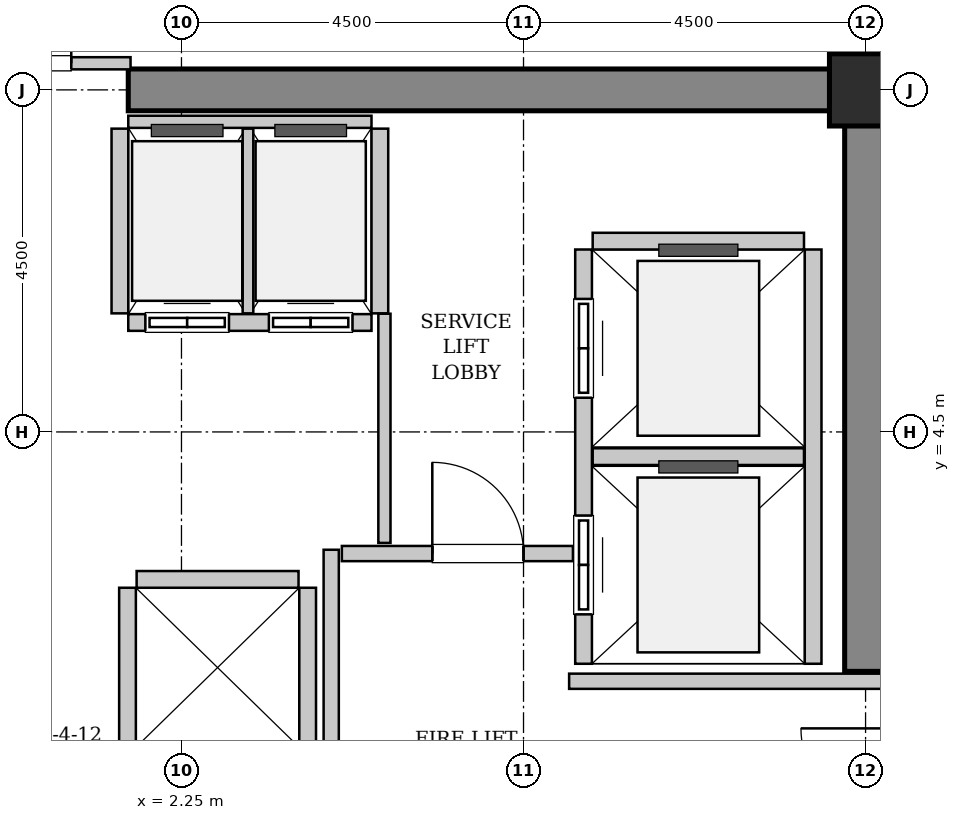
"""IFC4 building model, lengths in metres.
Left out: names, types, materials, properties, quantities, classifications, styles, units other than length and angle.
Written with IfcOpenShell. Run it as: python <this file> out.ifc"""

import sys

from ifc_helpers import new_model, si_unit, direction, frame, frame_2d, origin, origin_2d, place, context, subcontext, project, spatial, rectangle, hollow_rectangle, extrude, source, transform, mapped, element, fill, save


model = new_model("IFC4")
c1 = context("Model", 3, precision=1e-05, world=origin(), true_north=direction((0.0, 1.0)))
c2 = subcontext(c1, "Body", "Model", "MODEL_VIEW")
j1 = project(units=[si_unit("LENGTHUNIT", "METRE"), si_unit("PLANEANGLEUNIT", "RADIAN")], contexts=[c1])
p1 = place(None, origin())
s1 = spatial("IfcSite", under=j1, at=p1, CompositionType="ELEMENT")
p2 = place(p1, origin())
s2 = spatial("IfcBuilding", under=s1, at=p2, CompositionType="ELEMENT")
p3 = place(p2, frame((0.0, 0.0, 109.8)))
s3 = spatial("IfcBuildingStorey", under=s2, at=p3, CompositionType="ELEMENT", Elevation=109.8)
m1 = source(origin(), c2, "Body", "SweptSolid", [
    extrude(rectangle(XDim=9.975, YDim=0.55, at=frame_2d((4.987, 0.0))), origin(), (0.0, 0.0, 1.0), 3.8),
])
p4 = place(p3, frame((1.55, 9.0, 0.0), z_axis=(0.0, 0.0, 1.0), x_axis=(1.0, 0.0, 0.0)))
e1 = element("IfcWall", 1, at=p4, inside=s3, PredefinedType="SHEAR", context=c2, shape_type="MappedRepresentation", body=[
    mapped(m1, transform((0.0, 0.0, 0.0), x_axis=(1.0, 0.0, 0.0), y_axis=(0.0, 1.0, 0.0), z_axis=(0.0, 0.0, 1.0), scale=1.0)),
])
m2 = source(origin(), c2, "Body", "SweptSolid", [
    extrude(rectangle(XDim=7.375, YDim=0.55, at=frame_2d((3.688, 0.0))), origin(), (0.0, 0.0, 1.0), 3.8),
])
p5 = place(p3, frame((11.25, 1.35, 0.0), z_axis=(0.0, 0.0, 1.0), x_axis=(0.0, 1.0, 0.0)))
e2 = element("IfcWall", 2, at=p5, inside=s3, PredefinedType="SHEAR", context=c2, shape_type="MappedRepresentation", body=[
    mapped(m2, transform((0.0, 0.0, 0.0), x_axis=(1.0, 0.0, 0.0), y_axis=(0.0, 1.0, 0.0), z_axis=(0.0, 0.0, 1.0), scale=1.0)),
])
m3 = source(origin(), c2, "Body", "SweptSolid", [
    extrude(hollow_rectangle(XDim=0.95, YDim=0.95, WallThickness=0.045, InnerFilletRadius=0.045, OuterFilletRadius=0.09, at=origin_2d()), origin(), (0.0, 0.0, 1.0), 3.8),
])
p6 = place(p3, frame((11.25, 9.0, 0.0), z_axis=(0.0, 0.0, 1.0), x_axis=(1.0, 0.0, 0.0)))
e3 = element("IfcColumn", 3, at=p6, inside=s3, PredefinedType="COLUMN", context=c2, shape_type="MappedRepresentation", body=[
    mapped(m3, transform((0.0, 0.0, 0.0), x_axis=(1.0, 0.0, 0.0), y_axis=(0.0, 1.0, 0.0), z_axis=(0.0, 0.0, 1.0), scale=1.0)),
])
m4 = source(origin(), c2, "Body", "SweptSolid", [
    extrude(rectangle(XDim=5.45, YDim=0.22, at=frame_2d((2.725, 0.0))), origin(), (0.0, 0.0, 1.0), 3.535),
])
p7 = place(p3, frame((7.54, 6.9, 0.0), z_axis=(0.0, 0.0, 1.0), x_axis=(0.0, -1.0, 0.0)))
e4 = element("IfcWall", 4, at=p7, inside=s3, PredefinedType="SOLIDWALL", context=c2, shape_type="MappedRepresentation", body=[
    mapped(m4, transform((0.0, 0.0, 0.0), x_axis=(1.0, 0.0, 0.0), y_axis=(0.0, 1.0, 0.0), z_axis=(0.0, 0.0, 1.0), scale=1.0)),
])
p8 = place(p7, frame((3.5, 0.0, 0.0)))
e5 = element("IfcOpeningElement", 5, at=p8, cuts=e4, PredefinedType="OPENING", context=c2, shape_type="SweptSolid", body=[
    extrude(rectangle(XDim=1.3, YDim=2.3, at=frame_2d((0.65, 1.15))), frame((0.0, 0.12, 0.0), z_axis=(0.0, -1.0, 0.0), x_axis=(1.0, 0.0, 0.0)), (0.0, 0.0, 1.0), 0.24),
])
p9 = place(p7, frame((0.65, 0.0, 0.0)))
e6 = element("IfcOpeningElement", 6, at=p9, cuts=e4, PredefinedType="OPENING", context=c2, shape_type="SweptSolid", body=[
    extrude(rectangle(XDim=1.3, YDim=2.3, at=frame_2d((0.65, 1.15))), frame((0.0, 0.12, 0.0), z_axis=(0.0, -1.0, 0.0), x_axis=(1.0, 0.0, 0.0)), (0.0, 0.0, 1.0), 0.24),
])
p10 = place(p3, frame((10.56, 1.45, 0.0), z_axis=(0.0, 0.0, 1.0), x_axis=(0.0, 1.0, 0.0)))
e7 = element("IfcWall", 7, at=p10, inside=s3, PredefinedType="SOLIDWALL", context=c2, shape_type="MappedRepresentation", body=[
    mapped(m4, transform((0.0, 0.0, 0.0), x_axis=(1.0, 0.0, 0.0), y_axis=(0.0, 1.0, 0.0), z_axis=(0.0, 0.0, 1.0), scale=1.0)),
])
m5 = source(origin(), c2, "Body", "SweptSolid", [
    extrude(rectangle(XDim=2.78, YDim=0.22, at=frame_2d((1.39, 0.0))), origin(), (0.0, 0.0, 1.0), 3.535),
])
for number, where, z_axis, x_axis in (
    (8, (7.66, 4.175, 0.0), (0.0, 0.0, 1.0), (1.0, 0.0, 0.0)),
    (9, (10.44, 7.01, 0.0), (0.0, 0.0, 1.0), (-1.0, 0.0, 0.0)),
):
    element("IfcWall", number, at=place(p3, frame(where, z_axis=z_axis, x_axis=x_axis)), inside=s3, PredefinedType="SOLIDWALL", context=c2, shape_type="MappedRepresentation", body=[
        mapped(m5, transform((0.0, 0.0, 0.0), x_axis=(1.0, 0.0, 0.0), y_axis=(0.0, 1.0, 0.0), z_axis=(0.0, 0.0, 1.0), scale=1.0)),
    ])
m6 = source(origin(), c2, "Body", "SweptSolid", [
    extrude(rectangle(XDim=3.2, YDim=0.22, at=frame_2d((1.6, 0.0))), origin(), (0.0, 0.0, 1.0), 3.535),
])
p11 = place(p3, frame((1.55, 5.94, 0.0), z_axis=(0.0, 0.0, 1.0), x_axis=(1.0, 0.0, 0.0)))
e10 = element("IfcWall", 10, at=p11, inside=s3, PredefinedType="SOLIDWALL", context=c2, shape_type="MappedRepresentation", body=[
    mapped(m6, transform((0.0, 0.0, 0.0), x_axis=(1.0, 0.0, 0.0), y_axis=(0.0, 1.0, 0.0), z_axis=(0.0, 0.0, 1.0), scale=1.0)),
])
p12 = place(p11, frame((0.225, 0.0, 0.0)))
e11 = element("IfcOpeningElement", 11, at=p12, cuts=e10, PredefinedType="OPENING", context=c2, shape_type="SweptSolid", body=[
    extrude(rectangle(XDim=1.1, YDim=2.2, at=frame_2d((0.55, 1.1))), frame((0.0, 0.12, 0.0), z_axis=(0.0, -1.0, 0.0), x_axis=(1.0, 0.0, 0.0)), (0.0, 0.0, 1.0), 0.24),
])
p13 = place(p11, frame((1.85, 0.0, 0.0)))
e12 = element("IfcOpeningElement", 12, at=p13, cuts=e10, PredefinedType="OPENING", context=c2, shape_type="SweptSolid", body=[
    extrude(rectangle(XDim=1.1, YDim=2.2, at=frame_2d((0.55, 1.1))), frame((0.0, 0.12, 0.0), z_axis=(0.0, -1.0, 0.0), x_axis=(1.0, 0.0, 0.0)), (0.0, 0.0, 1.0), 0.24),
])
m7 = source(origin(), c2, "Body", "SweptSolid", [
    extrude(rectangle(XDim=3.2, YDim=0.16, at=frame_2d((1.6, 0.0))), origin(), (0.0, 0.0, 1.0), 2.425),
])
p14 = place(p3, frame((4.75, 8.58, 0.0), z_axis=(0.0, 0.0, 1.0), x_axis=(-1.0, 0.0, 0.0)))
e13 = element("IfcWall", 13, at=p14, inside=s3, PredefinedType="PARTITIONING", context=c2, shape_type="MappedRepresentation", body=[
    mapped(m7, transform((0.0, 0.0, 0.0), x_axis=(1.0, 0.0, 0.0), y_axis=(0.0, 1.0, 0.0), z_axis=(0.0, 0.0, 1.0), scale=1.0)),
])
m8 = source(origin(), c2, "Body", "SweptSolid", [
    extrude(rectangle(XDim=2.43, YDim=0.22, at=frame_2d((1.215, 0.0))), origin(), (0.0, 0.0, 1.0), 3.535),
])
p15 = place(p3, frame((1.44, 8.49, 0.0), z_axis=(0.0, 0.0, 1.0), x_axis=(0.0, -1.0, 0.0)))
e14 = element("IfcWall", 14, at=p15, inside=s3, PredefinedType="SOLIDWALL", context=c2, shape_type="MappedRepresentation", body=[
    mapped(m8, transform((0.0, 0.0, 0.0), x_axis=(1.0, 0.0, 0.0), y_axis=(0.0, 1.0, 0.0), z_axis=(0.0, 0.0, 1.0), scale=1.0)),
])
m9 = source(origin(), c2, "Body", "SweptSolid", [
    extrude(rectangle(XDim=2.43, YDim=0.14, at=frame_2d((1.215, 0.0))), origin(), (0.0, 0.0, 1.0), 3.535),
])
p16 = place(p3, frame((3.125, 6.06, 0.0), z_axis=(0.0, 0.0, 1.0), x_axis=(0.0, 1.0, 0.0)))
e15 = element("IfcWall", 15, at=p16, inside=s3, PredefinedType="PARTITIONING", context=c2, shape_type="MappedRepresentation", body=[
    mapped(m9, transform((0.0, 0.0, 0.0), x_axis=(1.0, 0.0, 0.0), y_axis=(0.0, 1.0, 0.0), z_axis=(0.0, 0.0, 1.0), scale=1.0)),
])
p17 = place(p3, frame((4.86, 6.06, 0.0), z_axis=(0.0, 0.0, 1.0), x_axis=(0.0, 1.0, 0.0)))
e16 = element("IfcWall", 16, at=p17, inside=s3, PredefinedType="SOLIDWALL", context=c2, shape_type="MappedRepresentation", body=[
    mapped(m8, transform((0.0, 0.0, 0.0), x_axis=(1.0, 0.0, 0.0), y_axis=(0.0, 1.0, 0.0), z_axis=(0.0, 0.0, 1.0), scale=1.0)),
])
m10 = source(origin(), c2, "Body", "SweptSolid", [
    extrude(rectangle(XDim=4.9, YDim=0.22, at=frame_2d((2.45, 0.0))), origin(), (0.0, 0.0, 1.0), 3.535),
])
for number, where, z_axis, x_axis in (
    (17, (1.54, 2.45, 0.0), (0.0, 0.0, 1.0), (0.0, -1.0, 0.0)),
    (18, (3.91, -2.45, 0.0), (0.0, 0.0, 1.0), (0.0, 1.0, 0.0)),
):
    element("IfcWall", number, at=place(p3, frame(where, z_axis=z_axis, x_axis=x_axis)), inside=s3, PredefinedType="SOLIDWALL", context=c2, shape_type="MappedRepresentation", body=[
        mapped(m10, transform((0.0, 0.0, 0.0), x_axis=(1.0, 0.0, 0.0), y_axis=(0.0, 1.0, 0.0), z_axis=(0.0, 0.0, 1.0), scale=1.0)),
    ])
m11 = source(origin(), c2, "Body", "SweptSolid", [
    extrude(rectangle(XDim=2.13, YDim=0.22, at=frame_2d((1.065, 0.0))), origin(), (0.0, 0.0, 1.0), 3.535),
])
p18 = place(p3, frame((3.79, 2.56, 0.0), z_axis=(0.0, 0.0, 1.0), x_axis=(-1.0, 0.0, 0.0)))
e19 = element("IfcWall", 19, at=p18, inside=s3, PredefinedType="SOLIDWALL", context=c2, shape_type="MappedRepresentation", body=[
    mapped(m11, transform((0.0, 0.0, 0.0), x_axis=(1.0, 0.0, 0.0), y_axis=(0.0, 1.0, 0.0), z_axis=(0.0, 0.0, 1.0), scale=1.0)),
])
m12 = source(origin(), c2, "Body", "SweptSolid", [
    extrude(rectangle(XDim=5.9, YDim=0.2, at=frame_2d((2.95, 0.0))), origin(), (0.0, 0.0, 1.0), 3.535),
])
p19 = place(p3, frame((4.22, -2.95, 0.0), z_axis=(0.0, 0.0, 1.0), x_axis=(0.0, 1.0, 0.0)))
e20 = element("IfcWall", 20, at=p19, inside=s3, PredefinedType="PARTITIONING", context=c2, shape_type="MappedRepresentation", body=[
    mapped(m12, transform((0.0, 0.0, 0.0), x_axis=(1.0, 0.0, 0.0), y_axis=(0.0, 1.0, 0.0), z_axis=(0.0, 0.0, 1.0), scale=1.0)),
])
m13 = source(origin(), c2, "Body", "SweptSolid", [
    extrude(rectangle(XDim=3.04, YDim=0.2, at=frame_2d((1.52, 0.0))), origin(), (0.0, 0.0, 1.0), 3.535),
])
p20 = place(p3, frame((4.36, 2.9, 0.0), z_axis=(0.0, 0.0, 1.0), x_axis=(1.0, 0.0, 0.0)))
e21 = element("IfcWall", 21, at=p20, inside=s3, PredefinedType="PARTITIONING", context=c2, shape_type="MappedRepresentation", body=[
    mapped(m13, transform((0.0, 0.0, 0.0), x_axis=(1.0, 0.0, 0.0), y_axis=(0.0, 1.0, 0.0), z_axis=(0.0, 0.0, 1.0), scale=1.0)),
])
p21 = place(p20, frame((1.19, 0.0, 0.0)))
e22 = element("IfcOpeningElement", 22, at=p21, cuts=e21, PredefinedType="OPENING", context=c2, shape_type="SweptSolid", body=[
    extrude(rectangle(XDim=1.2, YDim=2.15, at=frame_2d((0.6, 1.075))), frame((0.0, 0.11, 0.0), z_axis=(0.0, -1.0, 0.0), x_axis=(1.0, 0.0, 0.0)), (0.0, 0.0, 1.0), 0.22),
])
m14 = source(origin(), c2, "Body", "SweptSolid", [
    extrude(rectangle(XDim=4.11, YDim=0.2, at=frame_2d((2.055, 0.0))), origin(), (0.0, 0.0, 1.0), 3.535),
])
p22 = place(p3, frame((7.35, 1.22, 0.0), z_axis=(0.0, 0.0, 1.0), x_axis=(1.0, 0.0, 0.0)))
e23 = element("IfcWall", 23, at=p22, inside=s3, PredefinedType="PARTITIONING", context=c2, shape_type="MappedRepresentation", body=[
    mapped(m14, transform((0.0, 0.0, 0.0), x_axis=(1.0, 0.0, 0.0), y_axis=(0.0, 1.0, 0.0), z_axis=(0.0, 0.0, 1.0), scale=1.0)),
])
m15 = source(origin(), c2, "Body", "SweptSolid", [
    extrude(rectangle(XDim=3.16, YDim=0.16, at=frame_2d((1.58, 0.0))), origin(), (0.0, 0.0, 1.0), 2.425),
])
p23 = place(p3, frame((-1.58, 9.35, 0.0), z_axis=(0.0, 0.0, 1.0), x_axis=(1.0, 0.0, 0.0)))
e24 = element("IfcWall", 24, at=p23, inside=s3, PredefinedType="PARTITIONING", context=c2, shape_type="MappedRepresentation", body=[
    mapped(m15, transform((0.0, 0.0, 0.0), x_axis=(1.0, 0.0, 0.0), y_axis=(0.0, 1.0, 0.0), z_axis=(0.0, 0.0, 1.0), scale=1.0)),
])
p24 = place(p23, frame((0.78, 0.0, 0.0)))
e25 = element("IfcOpeningElement", 25, at=p24, cuts=e24, PredefinedType="OPENING", context=c2, shape_type="SweptSolid", body=[
    extrude(rectangle(XDim=1.6, YDim=2.3, at=frame_2d((0.8, 1.15))), frame((0.0, 0.09, 0.0), z_axis=(0.0, -1.0, 0.0), x_axis=(1.0, 0.0, 0.0)), (0.0, 0.0, 1.0), 0.18),
])
m16 = source(origin(), c2, "Body", "SweptSolid", [
    extrude(rectangle(XDim=3.015, YDim=0.16, at=frame_2d((1.507, 0.0))), origin(), (0.0, 0.0, 1.0), 3.535),
])
p25 = place(p3, frame((4.92, 3.04, 0.0), z_axis=(0.0, 0.0, 1.0), x_axis=(0.0, 1.0, 0.0)))
e26 = element("IfcWall", 26, at=p25, inside=s3, PredefinedType="PARTITIONING", context=c2, shape_type="MappedRepresentation", body=[
    mapped(m16, transform((0.0, 0.0, 0.0), x_axis=(1.0, 0.0, 0.0), y_axis=(0.0, 1.0, 0.0), z_axis=(0.0, 0.0, 1.0), scale=1.0)),
])
m17 = source(origin(), c2, "Body", "SweptSolid", [
    extrude(rectangle(XDim=1.3, YDim=2.3, at=frame_2d((0.65, 1.15))), frame((0.0, 0.025, 0.0), z_axis=(0.0, -1.0, 0.0), x_axis=(1.0, 0.0, 0.0)), (0.0, 0.0, 1.0), 0.05),
])
p26 = place(p8, origin())
e27 = element("IfcDoor", 27, at=p26, inside=s3, OperationType="SLIDING_TO_RIGHT", PredefinedType="DOOR", context=c2, shape_type="MappedRepresentation", body=[
    mapped(m17, transform((0.0, 0.0, 0.0), x_axis=(1.0, 0.0, 0.0), y_axis=(0.0, 1.0, 0.0), z_axis=(0.0, 0.0, 1.0), scale=1.0)),
])
fill(e5, e27)
p27 = place(p9, origin())
e28 = element("IfcDoor", 28, at=p27, inside=s3, OperationType="SLIDING_TO_RIGHT", PredefinedType="DOOR", context=c2, shape_type="MappedRepresentation", body=[
    mapped(m17, transform((0.0, 0.0, 0.0), x_axis=(1.0, 0.0, 0.0), y_axis=(0.0, 1.0, 0.0), z_axis=(0.0, 0.0, 1.0), scale=1.0)),
])
fill(e6, e28)
m18 = source(origin(), c2, "Body", "SweptSolid", [
    extrude(rectangle(XDim=1.1, YDim=2.2, at=frame_2d((0.55, 1.1))), frame((0.0, 0.025, 0.0), z_axis=(0.0, -1.0, 0.0), x_axis=(1.0, 0.0, 0.0)), (0.0, 0.0, 1.0), 0.05),
])
p28 = place(p12, origin())
e29 = element("IfcDoor", 29, at=p28, inside=s3, OperationType="DOUBLE_DOOR_SLIDING", PredefinedType="DOOR", context=c2, shape_type="MappedRepresentation", body=[
    mapped(m18, transform((0.0, 0.0, 0.0), x_axis=(1.0, 0.0, 0.0), y_axis=(0.0, 1.0, 0.0), z_axis=(0.0, 0.0, 1.0), scale=1.0)),
])
fill(e11, e29)
p29 = place(p13, origin())
e30 = element("IfcDoor", 30, at=p29, inside=s3, OperationType="DOUBLE_DOOR_SLIDING", PredefinedType="DOOR", context=c2, shape_type="MappedRepresentation", body=[
    mapped(m18, transform((0.0, 0.0, 0.0), x_axis=(1.0, 0.0, 0.0), y_axis=(0.0, 1.0, 0.0), z_axis=(0.0, 0.0, 1.0), scale=1.0)),
])
fill(e12, e30)
m19 = source(origin(), c2, "Body", "SweptSolid", [
    extrude(rectangle(XDim=1.2, YDim=2.15, at=frame_2d((0.6, 1.075))), frame((0.0, 0.025, 0.0), z_axis=(0.0, -1.0, 0.0), x_axis=(1.0, 0.0, 0.0)), (0.0, 0.0, 1.0), 0.05),
])
p30 = place(p21, origin())
e31 = element("IfcDoor", 31, at=p30, inside=s3, OperationType="SINGLE_SWING_LEFT", PredefinedType="DOOR", context=c2, shape_type="MappedRepresentation", body=[
    mapped(m19, transform((0.0, 0.0, 0.0), x_axis=(1.0, 0.0, 0.0), y_axis=(0.0, 1.0, 0.0), z_axis=(0.0, 0.0, 1.0), scale=1.0)),
])
fill(e22, e31)
m20 = source(origin(), c2, "Body", "SweptSolid", [
    extrude(rectangle(XDim=1.6, YDim=2.3, at=frame_2d((0.8, 1.15))), frame((0.0, 0.025, 0.0), z_axis=(0.0, -1.0, 0.0), x_axis=(1.0, 0.0, 0.0)), (0.0, 0.0, 1.0), 0.05),
])
p31 = place(p24, origin())
e32 = element("IfcDoor", 32, at=p31, inside=s3, OperationType="DOUBLE_DOOR_SINGLE_SWING", PredefinedType="DOOR", context=c2, shape_type="MappedRepresentation", body=[
    mapped(m20, transform((0.0, 0.0, 0.0), x_axis=(1.0, 0.0, 0.0), y_axis=(0.0, 1.0, 0.0), z_axis=(0.0, 0.0, 1.0), scale=1.0)),
])
fill(e25, e32)
save(model, sys.argv[1])
